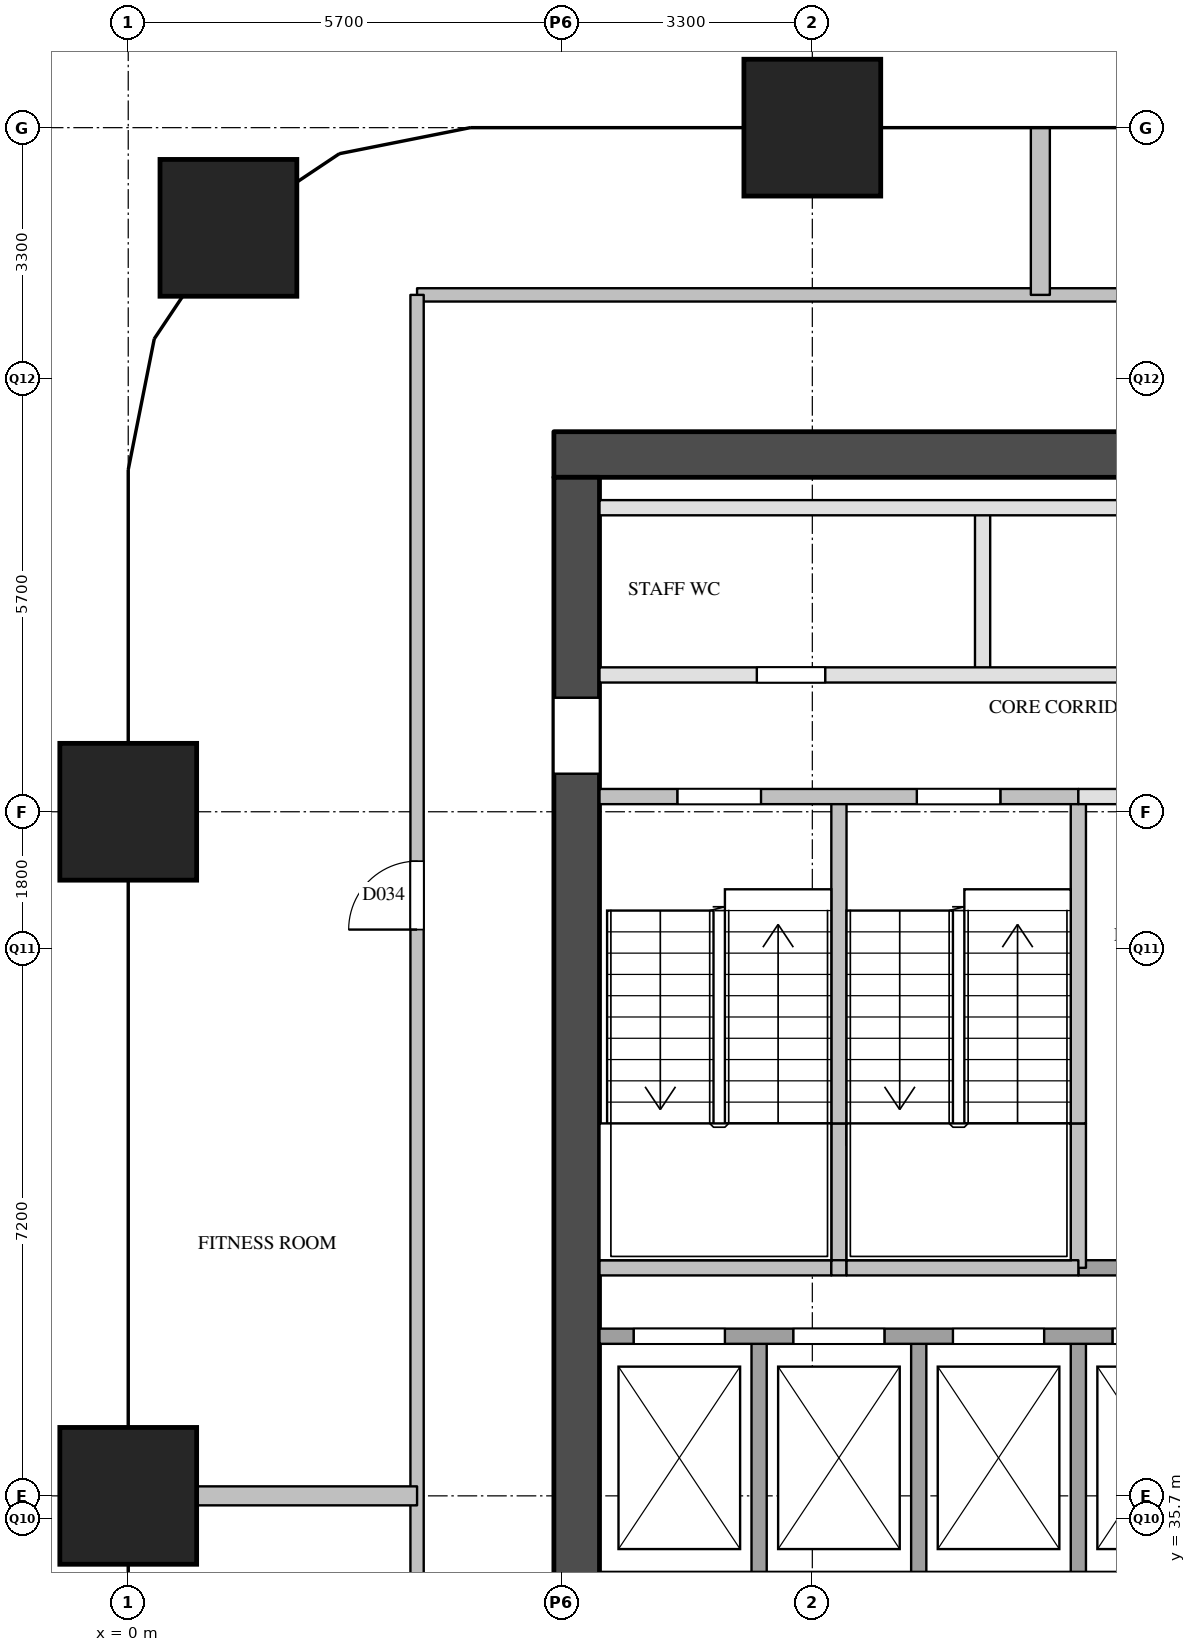
"""IFC4 building model, lengths in metres.
Left out: names, types, materials, properties, quantities, classifications, styles, units other than length and angle.
Written with IfcOpenShell. Run it as: python <this file> out.ifc"""

import sys

from ifc_helpers import new_model, si_unit, direction, frame, frame_2d, origin, origin_2d, place, context, subcontext, project, spatial, rectangle, extrude, element, fill, save


model = new_model("IFC4")
c1 = context("Model", 3, precision=1e-05, world=origin(), true_north=direction((0.0, 1.0)))
c2 = subcontext(c1, "Body", "Model", "MODEL_VIEW")
j1 = project(units=[si_unit("LENGTHUNIT", "METRE"), si_unit("PLANEANGLEUNIT", "RADIAN")], contexts=[c1])
p1 = place(None, origin())
s1 = spatial("IfcSite", under=j1, at=p1, CompositionType="ELEMENT")
p2 = place(p1, origin())
s2 = spatial("IfcBuilding", under=s1, at=p2, CompositionType="ELEMENT")
p3 = place(p2, frame((0.0, 0.0, 34.8)))
s3 = spatial("IfcBuildingStorey", under=s2, at=p3, CompositionType="ELEMENT", Elevation=34.8)
for number, where, z_axis, x_axis in (
    (1, (0.0, 36.0, 0.0), (0.0, 0.0, 1.0), (1.0, 0.0, 0.0)),
    (2, (0.0, 45.0, 0.0), (0.0, 0.0, 1.0), (1.0, 0.0, 0.0)),
    (3, (1.318, 52.682, 0.0), (0.0, 0.0, 1.0), (1.0, 0.0, 0.0)),
    (4, (9.0, 54.0, 0.0), (0.0, 0.0, 1.0), (1.0, 0.0, 0.0)),
):
    element("IfcColumn", number, at=place(p3, frame(where, z_axis=z_axis, x_axis=x_axis)), inside=s3, PredefinedType="COLUMN", context=c2, shape_type="SweptSolid", body=[
        extrude(rectangle(XDim=1.8, YDim=1.8, at=origin_2d()), origin(), (0.0, 0.0, 1.0), 3.8),
    ])
p4 = place(p3, frame((5.6, 49.7, 0.0), z_axis=(0.0, 0.0, 1.0), x_axis=(1.0, 0.0, 0.0)))
e5 = element("IfcWall", 5, at=p4, inside=s3, PredefinedType="SHEAR", context=c2, shape_type="SweptSolid", body=[
    extrude(rectangle(XDim=12.4, YDim=0.6, at=frame_2d((6.2, 0.0))), origin(), (0.0, 0.0, 1.0), 3.5),
])
p5 = place(p3, frame((5.9, 29.1, 0.0), z_axis=(0.0, 0.0, 1.0), x_axis=(0.0, 1.0, 0.0)))
e6 = element("IfcWall", 6, at=p5, inside=s3, PredefinedType="SHEAR", context=c2, shape_type="SweptSolid", body=[
    extrude(rectangle(XDim=20.3, YDim=0.6, at=frame_2d((10.15, 0.0))), origin(), (0.0, 0.0, 1.0), 3.5),
])
p6 = place(p5, frame((3.6, 0.0, 0.0)))
e7 = element("IfcOpeningElement", 7, at=p6, cuts=e6, PredefinedType="OPENING", context=c2, shape_type="SweptSolid", body=[
    extrude(rectangle(XDim=1.8, YDim=2.1, at=frame_2d((0.9, 1.05))), frame((0.0, 0.31, 0.0), z_axis=(0.0, -1.0, 0.0), x_axis=(1.0, 0.0, 0.0)), (0.0, 0.0, 1.0), 0.62),
])
p7 = place(p5, frame((16.4, 0.0, 0.0)))
e8 = element("IfcOpeningElement", 8, at=p7, cuts=e6, PredefinedType="OPENING", context=c2, shape_type="SweptSolid", body=[
    extrude(rectangle(XDim=1.0, YDim=2.1, at=frame_2d((0.5, 1.05))), frame((0.0, 0.31, 0.0), z_axis=(0.0, -1.0, 0.0), x_axis=(1.0, 0.0, 0.0)), (0.0, 0.0, 1.0), 0.62),
])
p8 = place(p3, frame((8.3, 34.9, 0.0), z_axis=(0.0, 0.0, 1.0), x_axis=(0.0, 1.0, 0.0)))
e9 = element("IfcWall", 9, at=p8, inside=s3, PredefinedType="SOLIDWALL", context=c2, shape_type="SweptSolid", body=[
    extrude(rectangle(XDim=3.2, YDim=0.2, at=frame_2d((1.6, 0.0))), origin(), (0.0, 0.0, 1.0), 3.5),
])
p9 = place(p3, frame((9.35, 39.0, 0.0), z_axis=(0.0, 0.0, 1.0), x_axis=(0.0, 1.0, 0.0)))
e10 = element("IfcWall", 10, at=p9, inside=s3, PredefinedType="SOLIDWALL", context=c2, shape_type="SweptSolid", body=[
    extrude(rectangle(XDim=1.9, YDim=0.2, at=frame_2d((0.95, 0.0))), origin(), (0.0, 0.0, 1.0), 3.5),
])
p10 = place(p3, frame((9.35, 40.9, 0.0), z_axis=(0.0, 0.0, 1.0), x_axis=(0.0, 1.0, 0.0)))
e11 = element("IfcWall", 11, at=p10, inside=s3, PredefinedType="SOLIDWALL", context=c2, shape_type="SweptSolid", body=[
    extrude(rectangle(XDim=4.3, YDim=0.2, at=frame_2d((2.15, 0.0))), origin(), (0.0, 0.0, 1.0), 3.5),
])
p11 = place(p3, frame((10.4, 34.9, 0.0), z_axis=(0.0, 0.0, 1.0), x_axis=(0.0, 1.0, 0.0)))
e12 = element("IfcWall", 12, at=p11, inside=s3, PredefinedType="SOLIDWALL", context=c2, shape_type="SweptSolid", body=[
    extrude(rectangle(XDim=3.2, YDim=0.2, at=frame_2d((1.6, 0.0))), origin(), (0.0, 0.0, 1.0), 3.5),
])
p12 = place(p3, frame((11.24, 46.8, 0.0), z_axis=(0.0, 0.0, 1.0), x_axis=(0.0, 1.0, 0.0)))
e13 = element("IfcWall", 13, at=p12, inside=s3, PredefinedType="PARTITIONING", context=c2, shape_type="SweptSolid", body=[
    extrude(rectangle(XDim=2.2, YDim=0.2, at=frame_2d((1.1, 0.0))), origin(), (0.0, 0.0, 1.0), 3.5),
])
p13 = place(p3, frame((12.5, 34.9, 0.0), z_axis=(0.0, 0.0, 1.0), x_axis=(0.0, 1.0, 0.0)))
e14 = element("IfcWall", 14, at=p13, inside=s3, PredefinedType="SOLIDWALL", context=c2, shape_type="SweptSolid", body=[
    extrude(rectangle(XDim=3.2, YDim=0.2, at=frame_2d((1.6, 0.0))), origin(), (0.0, 0.0, 1.0), 3.5),
])
p14 = place(p3, frame((12.5, 39.0, 0.0), z_axis=(0.0, 0.0, 1.0), x_axis=(0.0, 1.0, 0.0)))
e15 = element("IfcWall", 15, at=p14, inside=s3, PredefinedType="SOLIDWALL", context=c2, shape_type="SweptSolid", body=[
    extrude(rectangle(XDim=1.9, YDim=0.2, at=frame_2d((0.95, 0.0))), origin(), (0.0, 0.0, 1.0), 3.5),
])
p15 = place(p3, frame((12.5, 40.9, 0.0), z_axis=(0.0, 0.0, 1.0), x_axis=(0.0, 1.0, 0.0)))
e16 = element("IfcWall", 16, at=p15, inside=s3, PredefinedType="SOLIDWALL", context=c2, shape_type="SweptSolid", body=[
    extrude(rectangle(XDim=4.3, YDim=0.2, at=frame_2d((2.15, 0.0))), origin(), (0.0, 0.0, 1.0), 3.5),
])
p16 = place(p3, frame((6.2, 38.1, 0.0), z_axis=(0.0, 0.0, 1.0), x_axis=(1.0, 0.0, 0.0)))
e17 = element("IfcWall", 17, at=p16, inside=s3, PredefinedType="SOLIDWALL", context=c2, shape_type="SweptSolid", body=[
    extrude(rectangle(XDim=11.2, YDim=0.2, at=frame_2d((5.6, 0.0))), origin(), (0.0, 0.0, 1.0), 3.5),
])
p17 = place(p16, frame((0.45, 0.0, 0.0)))
e18 = element("IfcOpeningElement", 18, at=p17, cuts=e17, PredefinedType="OPENING", context=c2, shape_type="SweptSolid", body=[
    extrude(rectangle(XDim=1.2, YDim=2.1, at=frame_2d((0.6, 1.05))), frame((0.0, 0.11, 0.0), z_axis=(0.0, -1.0, 0.0), x_axis=(1.0, 0.0, 0.0)), (0.0, 0.0, 1.0), 0.22),
])
p18 = place(p16, frame((2.55, 0.0, 0.0)))
e19 = element("IfcOpeningElement", 19, at=p18, cuts=e17, PredefinedType="OPENING", context=c2, shape_type="SweptSolid", body=[
    extrude(rectangle(XDim=1.2, YDim=2.1, at=frame_2d((0.6, 1.05))), frame((0.0, 0.11, 0.0), z_axis=(0.0, -1.0, 0.0), x_axis=(1.0, 0.0, 0.0)), (0.0, 0.0, 1.0), 0.22),
])
p19 = place(p16, frame((4.65, 0.0, 0.0)))
e20 = element("IfcOpeningElement", 20, at=p19, cuts=e17, PredefinedType="OPENING", context=c2, shape_type="SweptSolid", body=[
    extrude(rectangle(XDim=1.2, YDim=2.1, at=frame_2d((0.6, 1.05))), frame((0.0, 0.11, 0.0), z_axis=(0.0, -1.0, 0.0), x_axis=(1.0, 0.0, 0.0)), (0.0, 0.0, 1.0), 0.22),
])
p20 = place(p16, frame((6.75, 0.0, 0.0)))
e21 = element("IfcOpeningElement", 21, at=p20, cuts=e17, PredefinedType="OPENING", context=c2, shape_type="SweptSolid", body=[
    extrude(rectangle(XDim=1.2, YDim=2.1, at=frame_2d((0.6, 1.05))), frame((0.0, 0.11, 0.0), z_axis=(0.0, -1.0, 0.0), x_axis=(1.0, 0.0, 0.0)), (0.0, 0.0, 1.0), 0.22),
])
p21 = place(p3, frame((12.5, 39.0, 0.0), z_axis=(0.0, 0.0, 1.0), x_axis=(1.0, 0.0, 0.0)))
e22 = element("IfcWall", 22, at=p21, inside=s3, PredefinedType="SOLIDWALL", context=c2, shape_type="SweptSolid", body=[
    extrude(rectangle(XDim=4.9, YDim=0.2, at=frame_2d((2.45, 0.0))), origin(), (0.0, 0.0, 1.0), 3.5),
])
p22 = place(p3, frame((6.2, 39.0, 0.0), z_axis=(0.0, 0.0, 1.0), x_axis=(1.0, 0.0, 0.0)))
e23 = element("IfcWall", 23, at=p22, inside=s3, PredefinedType="SOLIDWALL", context=c2, shape_type="SweptSolid", body=[
    extrude(rectangle(XDim=3.05, YDim=0.2, at=frame_2d((1.525, 0.0))), origin(), (0.0, 0.0, 1.0), 3.5),
])
p23 = place(p3, frame((9.25, 39.0, 0.0), z_axis=(0.0, 0.0, 1.0), x_axis=(1.0, 0.0, 0.0)))
e24 = element("IfcWall", 24, at=p23, inside=s3, PredefinedType="SOLIDWALL", context=c2, shape_type="SweptSolid", body=[
    extrude(rectangle(XDim=0.2, YDim=0.2, at=frame_2d((0.1, 0.0))), origin(), (0.0, 0.0, 1.0), 3.5),
])
p24 = place(p3, frame((9.45, 39.0, 0.0), z_axis=(0.0, 0.0, 1.0), x_axis=(1.0, 0.0, 0.0)))
e25 = element("IfcWall", 25, at=p24, inside=s3, PredefinedType="SOLIDWALL", context=c2, shape_type="SweptSolid", body=[
    extrude(rectangle(XDim=3.05, YDim=0.2, at=frame_2d((1.525, 0.0))), origin(), (0.0, 0.0, 1.0), 3.5),
])
p25 = place(p3, frame((12.5, 45.2, 0.0), z_axis=(0.0, 0.0, 1.0), x_axis=(1.0, 0.0, 0.0)))
e26 = element("IfcWall", 26, at=p25, inside=s3, PredefinedType="PARTITIONING", context=c2, shape_type="SweptSolid", body=[
    extrude(rectangle(XDim=4.9, YDim=0.2, at=frame_2d((2.45, 0.0))), origin(), (0.0, 0.0, 1.0), 3.5),
])
p26 = place(p25, frame((2.0, 0.0, 0.0)))
e27 = element("IfcOpeningElement", 27, at=p26, cuts=e26, PredefinedType="OPENING", context=c2, shape_type="SweptSolid", body=[
    extrude(rectangle(XDim=0.9, YDim=2.1, at=frame_2d((0.45, 1.05))), frame((0.0, 0.11, 0.0), z_axis=(0.0, -1.0, 0.0), x_axis=(1.0, 0.0, 0.0)), (0.0, 0.0, 1.0), 0.22),
])
p27 = place(p3, frame((6.2, 45.2, 0.0), z_axis=(0.0, 0.0, 1.0), x_axis=(1.0, 0.0, 0.0)))
e28 = element("IfcWall", 28, at=p27, inside=s3, PredefinedType="SOLIDWALL", context=c2, shape_type="SweptSolid", body=[
    extrude(rectangle(XDim=6.3, YDim=0.2, at=frame_2d((3.15, 0.0))), origin(), (0.0, 0.0, 1.0), 3.5),
])
p28 = place(p27, frame((1.025, 0.0, 0.0)))
e29 = element("IfcOpeningElement", 29, at=p28, cuts=e28, PredefinedType="OPENING", context=c2, shape_type="SweptSolid", body=[
    extrude(rectangle(XDim=1.1, YDim=2.1, at=frame_2d((0.55, 1.05))), frame((0.0, 0.11, 0.0), z_axis=(0.0, -1.0, 0.0), x_axis=(1.0, 0.0, 0.0)), (0.0, 0.0, 1.0), 0.22),
])
p29 = place(p27, frame((4.175, 0.0, 0.0)))
e30 = element("IfcOpeningElement", 30, at=p29, cuts=e28, PredefinedType="OPENING", context=c2, shape_type="SweptSolid", body=[
    extrude(rectangle(XDim=1.1, YDim=2.1, at=frame_2d((0.55, 1.05))), frame((0.0, 0.11, 0.0), z_axis=(0.0, -1.0, 0.0), x_axis=(1.0, 0.0, 0.0)), (0.0, 0.0, 1.0), 0.22),
])
p30 = place(p3, frame((6.2, 46.8, 0.0), z_axis=(0.0, 0.0, 1.0), x_axis=(1.0, 0.0, 0.0)))
e31 = element("IfcWall", 31, at=p30, inside=s3, PredefinedType="PARTITIONING", context=c2, shape_type="SweptSolid", body=[
    extrude(rectangle(XDim=11.2, YDim=0.2, at=frame_2d((5.6, 0.0))), origin(), (0.0, 0.0, 1.0), 3.5),
])
p31 = place(p30, frame((2.07, 0.0, 0.0)))
e32 = element("IfcOpeningElement", 32, at=p31, cuts=e31, PredefinedType="OPENING", context=c2, shape_type="SweptSolid", body=[
    extrude(rectangle(XDim=0.9, YDim=2.1, at=frame_2d((0.45, 1.05))), frame((0.0, 0.11, 0.0), z_axis=(0.0, -1.0, 0.0), x_axis=(1.0, 0.0, 0.0)), (0.0, 0.0, 1.0), 0.22),
])
p32 = place(p30, frame((7.67, 0.0, 0.0)))
e33 = element("IfcOpeningElement", 33, at=p32, cuts=e31, PredefinedType="OPENING", context=c2, shape_type="SweptSolid", body=[
    extrude(rectangle(XDim=0.9, YDim=2.1, at=frame_2d((0.45, 1.05))), frame((0.0, 0.11, 0.0), z_axis=(0.0, -1.0, 0.0), x_axis=(1.0, 0.0, 0.0)), (0.0, 0.0, 1.0), 0.22),
])
p33 = place(p3, frame((6.2, 49.0, 0.0), z_axis=(0.0, 0.0, 1.0), x_axis=(1.0, 0.0, 0.0)))
e34 = element("IfcWall", 34, at=p33, inside=s3, PredefinedType="PARTITIONING", context=c2, shape_type="SweptSolid", body=[
    extrude(rectangle(XDim=11.2, YDim=0.2, at=frame_2d((5.6, 0.0))), origin(), (0.0, 0.0, 1.0), 3.5),
])
p34 = place(p3, frame((3.8, 51.8, 0.0), z_axis=(0.0, 0.0, 1.0), x_axis=(1.0, 0.0, 0.0)))
e35 = element("IfcWall", 35, at=p34, inside=s3, PredefinedType="PARTITIONING", context=c2, shape_type="SweptSolid", body=[
    extrude(rectangle(XDim=16.0, YDim=0.175, at=frame_2d((8.0, 0.0))), origin(), (0.0, 0.0, 1.0), 3.5),
])
p35 = place(p34, frame((11.65, 0.0, 0.0)))
e36 = element("IfcOpeningElement", 36, at=p35, cuts=e35, PredefinedType="OPENING", context=c2, shape_type="SweptSolid", body=[
    extrude(rectangle(XDim=0.9, YDim=2.1, at=frame_2d((0.45, 1.05))), frame((0.0, 0.097, 0.0), z_axis=(0.0, -1.0, 0.0), x_axis=(1.0, 0.0, 0.0)), (0.0, 0.0, 1.0), 0.195),
])
p36 = place(p3, frame((3.8, 26.7, 0.0), z_axis=(0.0, 0.0, 1.0), x_axis=(0.0, 1.0, 0.0)))
e37 = element("IfcWall", 37, at=p36, inside=s3, PredefinedType="PARTITIONING", context=c2, shape_type="SweptSolid", body=[
    extrude(rectangle(XDim=25.1, YDim=0.175, at=frame_2d((12.55, 0.0))), origin(), (0.0, 0.0, 1.0), 2.5),
])
p37 = place(p36, frame((2.2, 0.0, 0.0)))
e38 = element("IfcOpeningElement", 38, at=p37, cuts=e37, PredefinedType="OPENING", context=c2, shape_type="SweptSolid", body=[
    extrude(rectangle(XDim=0.9, YDim=2.1, at=frame_2d((0.45, 1.05))), frame((0.0, 0.097, 0.0), z_axis=(0.0, -1.0, 0.0), x_axis=(1.0, 0.0, 0.0)), (0.0, 0.0, 1.0), 0.195),
])
p38 = place(p36, frame((6.85, 0.0, 0.0)))
e39 = element("IfcOpeningElement", 39, at=p38, cuts=e37, PredefinedType="OPENING", context=c2, shape_type="SweptSolid", body=[
    extrude(rectangle(XDim=0.9, YDim=2.1, at=frame_2d((0.45, 1.05))), frame((0.0, 0.097, 0.0), z_axis=(0.0, -1.0, 0.0), x_axis=(1.0, 0.0, 0.0)), (0.0, 0.0, 1.0), 0.195),
])
p39 = place(p36, frame((16.75, 0.0, 0.0)))
e40 = element("IfcOpeningElement", 40, at=p39, cuts=e37, PredefinedType="OPENING", context=c2, shape_type="SweptSolid", body=[
    extrude(rectangle(XDim=0.9, YDim=2.1, at=frame_2d((0.45, 1.05))), frame((0.0, 0.097, 0.0), z_axis=(0.0, -1.0, 0.0), x_axis=(1.0, 0.0, 0.0)), (0.0, 0.0, 1.0), 0.195),
])
p40 = place(p3, frame((0.0, 36.0, 0.0), z_axis=(0.0, 0.0, 1.0), x_axis=(1.0, 0.0, 0.0)))
e41 = element("IfcWall", 41, at=p40, inside=s3, PredefinedType="PARTITIONING", context=c2, shape_type="SweptSolid", body=[
    extrude(rectangle(XDim=3.8, YDim=0.25, at=frame_2d((1.9, 0.0))), origin(), (0.0, 0.0, 1.0), 3.5),
])
p41 = place(p3, frame((12.0, 51.8, 0.0), z_axis=(0.0, 0.0, 1.0), x_axis=(0.0, 1.0, 0.0)))
e42 = element("IfcWall", 42, at=p41, inside=s3, PredefinedType="PARTITIONING", context=c2, shape_type="SweptSolid", body=[
    extrude(rectangle(XDim=2.2, YDim=0.25, at=frame_2d((1.1, 0.0))), origin(), (0.0, 0.0, 1.0), 2.5),
])
p42 = place(p17, origin())
e43 = element("IfcDoor", 43, at=p42, inside=s3, OperationType="SLIDING_TO_LEFT", PredefinedType="DOOR", context=c2, shape_type="SweptSolid", body=[
    extrude(rectangle(XDim=1.2, YDim=2.1, at=frame_2d((0.6, 1.05))), frame((0.0, 0.025, 0.0), z_axis=(0.0, -1.0, 0.0), x_axis=(1.0, 0.0, 0.0)), (0.0, 0.0, 1.0), 0.05),
])
fill(e18, e43)
p43 = place(p18, origin())
e44 = element("IfcDoor", 44, at=p43, inside=s3, OperationType="SLIDING_TO_LEFT", PredefinedType="DOOR", context=c2, shape_type="SweptSolid", body=[
    extrude(rectangle(XDim=1.2, YDim=2.1, at=frame_2d((0.6, 1.05))), frame((0.0, 0.025, 0.0), z_axis=(0.0, -1.0, 0.0), x_axis=(1.0, 0.0, 0.0)), (0.0, 0.0, 1.0), 0.05),
])
fill(e19, e44)
p44 = place(p19, origin())
e45 = element("IfcDoor", 45, at=p44, inside=s3, OperationType="SLIDING_TO_LEFT", PredefinedType="DOOR", context=c2, shape_type="SweptSolid", body=[
    extrude(rectangle(XDim=1.2, YDim=2.1, at=frame_2d((0.6, 1.05))), frame((0.0, 0.025, 0.0), z_axis=(0.0, -1.0, 0.0), x_axis=(1.0, 0.0, 0.0)), (0.0, 0.0, 1.0), 0.05),
])
fill(e20, e45)
p45 = place(p20, origin())
e46 = element("IfcDoor", 46, at=p45, inside=s3, OperationType="SLIDING_TO_LEFT", PredefinedType="DOOR", context=c2, shape_type="SweptSolid", body=[
    extrude(rectangle(XDim=1.2, YDim=2.1, at=frame_2d((0.6, 1.05))), frame((0.0, 0.025, 0.0), z_axis=(0.0, -1.0, 0.0), x_axis=(1.0, 0.0, 0.0)), (0.0, 0.0, 1.0), 0.05),
])
fill(e21, e46)
p46 = place(p28, origin())
e47 = element("IfcDoor", 47, at=p46, inside=s3, OperationType="SINGLE_SWING_LEFT", PredefinedType="DOOR", context=c2, shape_type="SweptSolid", body=[
    extrude(rectangle(XDim=1.1, YDim=2.1, at=frame_2d((0.55, 1.05))), frame((0.0, 0.025, 0.0), z_axis=(0.0, -1.0, 0.0), x_axis=(1.0, 0.0, 0.0)), (0.0, 0.0, 1.0), 0.05),
])
fill(e29, e47)
p47 = place(p29, origin())
e48 = element("IfcDoor", 48, at=p47, inside=s3, OperationType="SINGLE_SWING_RIGHT", PredefinedType="DOOR", context=c2, shape_type="SweptSolid", body=[
    extrude(rectangle(XDim=1.1, YDim=2.1, at=frame_2d((0.55, 1.05))), frame((0.0, 0.025, 0.0), z_axis=(0.0, -1.0, 0.0), x_axis=(1.0, 0.0, 0.0)), (0.0, 0.0, 1.0), 0.05),
])
fill(e30, e48)
p48 = place(p7, origin())
e49 = element("IfcDoor", 49, at=p48, inside=s3, OperationType="SINGLE_SWING_RIGHT", PredefinedType="DOOR", context=c2, shape_type="SweptSolid", body=[
    extrude(rectangle(XDim=1.0, YDim=2.1, at=frame_2d((0.5, 1.05))), frame((0.0, 0.025, 0.0), z_axis=(0.0, -1.0, 0.0), x_axis=(1.0, 0.0, 0.0)), (0.0, 0.0, 1.0), 0.05),
])
fill(e8, e49)
p49 = place(p31, origin())
e50 = element("IfcDoor", 50, at=p49, inside=s3, OperationType="SINGLE_SWING_LEFT", PredefinedType="DOOR", context=c2, shape_type="SweptSolid", body=[
    extrude(rectangle(XDim=0.9, YDim=2.1, at=frame_2d((0.45, 1.05))), frame((0.0, 0.025, 0.0), z_axis=(0.0, -1.0, 0.0), x_axis=(1.0, 0.0, 0.0)), (0.0, 0.0, 1.0), 0.05),
])
fill(e32, e50)
p50 = place(p39, origin())
e51 = element("IfcDoor", 51, at=p50, inside=s3, OperationType="SINGLE_SWING_LEFT", PredefinedType="DOOR", context=c2, shape_type="SweptSolid", body=[
    extrude(rectangle(XDim=0.9, YDim=2.1, at=frame_2d((0.45, 1.05))), frame((0.0, 0.025, 0.0), z_axis=(0.0, -1.0, 0.0), x_axis=(1.0, 0.0, 0.0)), (0.0, 0.0, 1.0), 0.05),
])
fill(e40, e51)
save(model, sys.argv[1])
